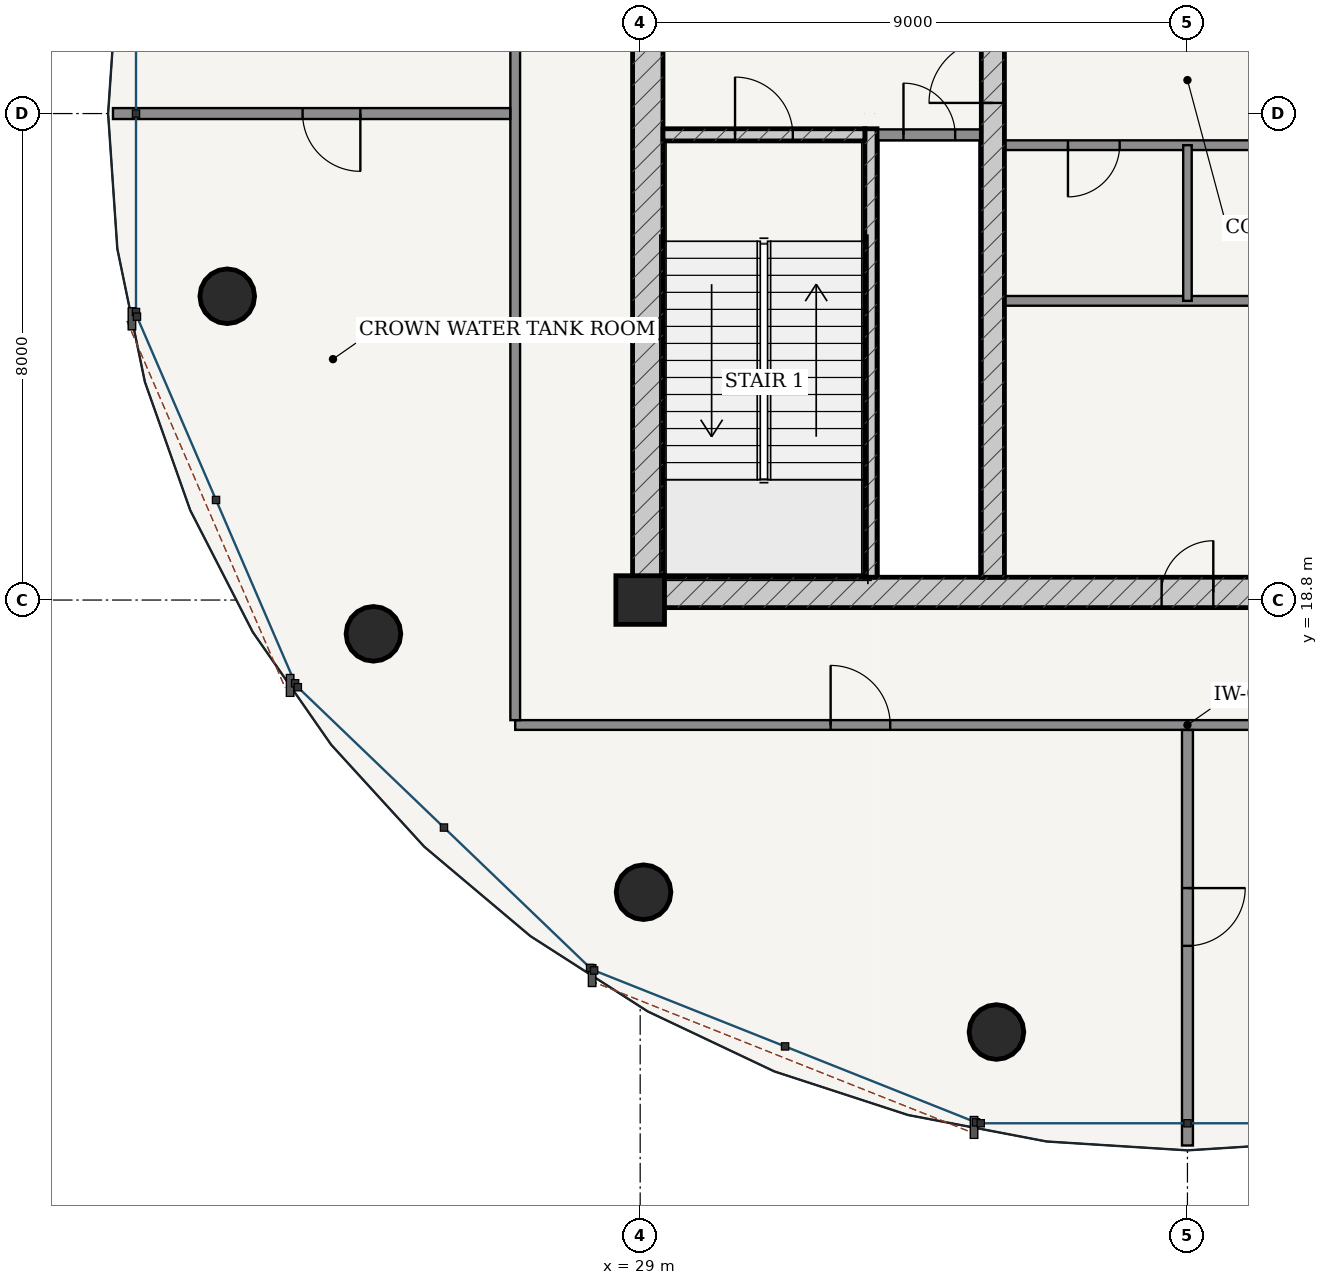
"""IFC4 building model, lengths in metres.
Left out: names, types, materials, properties, quantities, classifications, styles, units other than length and angle.
Written with IfcOpenShell. Run it as: python <this file> out.ifc"""

import sys

from ifc_helpers import new_model, si_unit, direction, frame, frame_2d, origin, origin_2d, place, context, subcontext, project, spatial, rectangle, hollow_circle, extrude, source, transform, mapped, element, fill, save


model = new_model("IFC4")
c1 = context("Model", 3, precision=1e-05, world=origin(), true_north=direction((-0.2419218956, 0.970295726276)))
c2 = subcontext(c1, "Body", "Model", "MODEL_VIEW")
j1 = project(units=[si_unit("LENGTHUNIT", "METRE"), si_unit("PLANEANGLEUNIT", "RADIAN")], contexts=[c1])
p1 = place(None, origin())
s1 = spatial("IfcSite", under=j1, at=p1, CompositionType="ELEMENT")
p2 = place(p1, origin())
s2 = spatial("IfcBuilding", under=s1, at=p2, CompositionType="ELEMENT")
p3 = place(p2, frame((0.0, 0.0, 316.5)))
s3 = spatial("IfcBuildingStorey", under=s2, at=p3, CompositionType="ELEMENT", Elevation=316.5)
p4 = place(p3, frame((29.0, 18.8, 0.0), z_axis=(0.0, 0.0, 1.0), x_axis=(1.0, 0.0, 0.0)))
e1 = element("IfcColumn", 1, at=p4, inside=s3, PredefinedType="COLUMN", context=c2, shape_type="SweptSolid", body=[
    extrude(rectangle(XDim=0.8, YDim=0.8, at=origin_2d()), origin(), (0.0, 0.0, 1.0), 5.2),
])
p5 = place(p3, frame((28.875, 18.925, 0.0), z_axis=(0.0, 0.0, 1.0), x_axis=(1.0, 0.0, 0.0)))
e2 = element("IfcWall", 2, at=p5, inside=s3, PredefinedType="SHEAR", context=c2, shape_type="SweptSolid", body=[
    extrude(rectangle(XDim=18.25, YDim=0.5, at=frame_2d((9.125, 0.0))), origin(), (0.0, 0.0, 1.0), 4.78),
])
p6 = place(p5, frame((8.7, 0.0, 0.0)))
e3 = element("IfcOpeningElement", 3, at=p6, cuts=e2, PredefinedType="OPENING", context=c2, shape_type="SweptSolid", body=[
    extrude(rectangle(XDim=0.85, YDim=2.1, at=frame_2d((0.425, 1.05))), frame((0.0, 0.26, 0.0), z_axis=(0.0, -1.0, 0.0), x_axis=(1.0, 0.0, 0.0)), (0.0, 0.0, 1.0), 0.52),
])
p7 = place(p3, frame((29.125, 19.175, 0.0), z_axis=(0.0, 0.0, 1.0), x_axis=(0.0, 1.0, 0.0)))
e4 = element("IfcWall", 4, at=p7, inside=s3, PredefinedType="SHEAR", context=c2, shape_type="SweptSolid", body=[
    extrude(rectangle(XDim=15.25, YDim=0.5, at=frame_2d((7.625, 0.0))), origin(), (0.0, 0.0, 1.0), 4.78),
])
p8 = place(p7, frame((9.875, 0.0, 0.0)))
e5 = element("IfcOpeningElement", 5, at=p8, cuts=e4, PredefinedType="OPENING", context=c2, shape_type="SweptSolid", body=[
    extrude(rectangle(XDim=1.5, YDim=2.2, at=frame_2d((0.75, 1.1))), frame((0.0, 0.26, 0.0), z_axis=(0.0, -1.0, 0.0), x_axis=(1.0, 0.0, 0.0)), (0.0, 0.0, 1.0), 0.52),
])
p9 = place(p3, frame((32.795, 19.175, 0.0), z_axis=(0.0, 0.0, 1.0), x_axis=(0.0, 1.0, 0.0)))
e6 = element("IfcWall", 6, at=p9, inside=s3, PredefinedType="SOLIDWALL", context=c2, shape_type="SweptSolid", body=[
    extrude(rectangle(XDim=7.375, YDim=0.2, at=frame_2d((3.688, 0.0))), origin(), (0.0, 0.0, 1.0), 4.78),
])
p10 = place(p3, frame((29.375, 26.45, 0.0), z_axis=(0.0, 0.0, 1.0), x_axis=(1.0, 0.0, 0.0)))
e7 = element("IfcWall", 7, at=p10, inside=s3, PredefinedType="SOLIDWALL", context=c2, shape_type="SweptSolid", body=[
    extrude(rectangle(XDim=3.32, YDim=0.2, at=frame_2d((1.66, 0.0))), origin(), (0.0, 0.0, 1.0), 4.78),
])
p11 = place(p10, frame((1.185, 0.0, 0.0)))
e8 = element("IfcOpeningElement", 8, at=p11, cuts=e7, PredefinedType="OPENING", context=c2, shape_type="SweptSolid", body=[
    extrude(rectangle(XDim=0.95, YDim=2.15, at=frame_2d((0.475, 1.075))), frame((0.0, 0.11, 0.0), z_axis=(0.0, -1.0, 0.0), x_axis=(1.0, 0.0, 0.0)), (0.0, 0.0, 1.0), 0.22),
])
p12 = place(p3, frame((34.8, 19.175, 0.0), z_axis=(0.0, 0.0, 1.0), x_axis=(0.0, 1.0, 0.0)))
e9 = element("IfcWall", 9, at=p12, inside=s3, PredefinedType="SHEAR", context=c2, shape_type="SweptSolid", body=[
    extrude(rectangle(XDim=15.25, YDim=0.38, at=frame_2d((7.625, 0.0))), origin(), (0.0, 0.0, 1.0), 4.78),
])
p13 = place(p12, frame((7.8, 0.0, 0.0)))
e10 = element("IfcOpeningElement", 10, at=p13, cuts=e9, PredefinedType="OPENING", context=c2, shape_type="SweptSolid", body=[
    extrude(rectangle(XDim=1.05, YDim=2.15, at=frame_2d((0.525, 1.075))), frame((0.0, 0.2, 0.0), z_axis=(0.0, -1.0, 0.0), x_axis=(1.0, 0.0, 0.0)), (0.0, 0.0, 1.0), 0.4),
])
for number, where, z_axis, x_axis in (
    (11, (22.209, 23.796, 0.0), (0.0, 0.0, 1.0), (1.0, 0.0, 0.0)),
    (12, (24.613, 18.244, 0.0), (0.0, 0.0, 1.0), (1.0, 0.0, 0.0)),
    (13, (29.055, 13.995, 0.0), (0.0, 0.0, 1.0), (1.0, 0.0, 0.0)),
    (14, (34.859, 11.696, 0.0), (0.0, 0.0, 1.0), (1.0, 0.0, 0.0)),
):
    element("IfcColumn", number, at=place(p3, frame(where, z_axis=z_axis, x_axis=x_axis)), inside=s3, PredefinedType="COLUMN", context=c2, shape_type="SweptSolid", body=[
        extrude(hollow_circle(Radius=0.45, WallThickness=0.032, at=origin_2d()), origin(), (0.0, 0.0, 1.0), 5.2),
    ])
p14 = place(p3, frame((32.9, 26.45, 0.0), z_axis=(0.0, 0.0, 1.0), x_axis=(1.0, 0.0, 0.0)))
e15 = element("IfcWall", 15, at=p14, inside=s3, PredefinedType="PARTITIONING", context=c2, shape_type="SweptSolid", body=[
    extrude(rectangle(XDim=1.71, YDim=0.18, at=frame_2d((0.855, 0.0))), origin(), (0.0, 0.0, 1.0), 4.78),
])
p15 = place(p14, frame((0.43, 0.0, 0.0)))
e16 = element("IfcOpeningElement", 16, at=p15, cuts=e15, PredefinedType="OPENING", context=c2, shape_type="SweptSolid", body=[
    extrude(rectangle(XDim=0.85, YDim=2.1, at=frame_2d((0.425, 1.05))), frame((0.0, 0.1, 0.0), z_axis=(0.0, -1.0, 0.0), x_axis=(1.0, 0.0, 0.0)), (0.0, 0.0, 1.0), 0.2),
])
p16 = place(p3, frame((34.99, 26.28, 0.0), z_axis=(0.0, 0.0, 1.0), x_axis=(1.0, 0.0, 0.0)))
e17 = element("IfcWall", 17, at=p16, inside=s3, PredefinedType="PARTITIONING", context=c2, shape_type="SweptSolid", body=[
    extrude(rectangle(XDim=6.02, YDim=0.16, at=frame_2d((3.01, 0.0))), origin(), (0.0, 0.0, 1.0), 4.78),
])
p17 = place(p16, frame((1.045, 0.0, 0.0)))
e18 = element("IfcOpeningElement", 18, at=p17, cuts=e17, PredefinedType="OPENING", context=c2, shape_type="SweptSolid", body=[
    extrude(rectangle(XDim=0.85, YDim=2.1, at=frame_2d((0.425, 1.05))), frame((0.0, 0.09, 0.0), z_axis=(0.0, -1.0, 0.0), x_axis=(1.0, 0.0, 0.0)), (0.0, 0.0, 1.0), 0.18),
])
p18 = place(p16, frame((4.125, 0.0, 0.0)))
e19 = element("IfcOpeningElement", 19, at=p18, cuts=e17, PredefinedType="OPENING", context=c2, shape_type="SweptSolid", body=[
    extrude(rectangle(XDim=0.85, YDim=2.1, at=frame_2d((0.425, 1.05))), frame((0.0, 0.09, 0.0), z_axis=(0.0, -1.0, 0.0), x_axis=(1.0, 0.0, 0.0)), (0.0, 0.0, 1.0), 0.18),
])
p19 = place(p3, frame((34.99, 23.72, 0.0), z_axis=(0.0, 0.0, 1.0), x_axis=(1.0, 0.0, 0.0)))
e20 = element("IfcWall", 20, at=p19, inside=s3, PredefinedType="PARTITIONING", context=c2, shape_type="SweptSolid", body=[
    extrude(rectangle(XDim=6.02, YDim=0.16, at=frame_2d((3.01, 0.0))), origin(), (0.0, 0.0, 1.0), 4.78),
])
p20 = place(p3, frame((38.0, 23.72, 0.0), z_axis=(0.0, 0.0, 1.0), x_axis=(0.0, 1.0, 0.0)))
e21 = element("IfcWall", 21, at=p20, inside=s3, PredefinedType="PARTITIONING", context=c2, shape_type="SweptSolid", body=[
    extrude(rectangle(XDim=2.56, YDim=0.14, at=frame_2d((1.28, 0.0))), origin(), (0.0, 0.0, 1.0), 4.78),
])
p21 = place(p3, frame((26.945, 16.745, 0.0), z_axis=(0.0, 0.0, 1.0), x_axis=(1.0, 0.0, 0.0)))
e22 = element("IfcWall", 22, at=p21, inside=s3, PredefinedType="PARTITIONING", context=c2, shape_type="SweptSolid", body=[
    extrude(rectangle(XDim=22.11, YDim=0.16, at=frame_2d((11.055, 0.0))), origin(), (0.0, 0.0, 1.0), 4.352),
])
p22 = place(p21, frame((5.187, 0.0, 0.0)))
e23 = element("IfcOpeningElement", 23, at=p22, cuts=e22, PredefinedType="OPENING", context=c2, shape_type="SweptSolid", body=[
    extrude(rectangle(XDim=0.98, YDim=2.2, at=frame_2d((0.49, 1.1))), frame((0.0, 0.09, 0.0), z_axis=(0.0, -1.0, 0.0), x_axis=(1.0, 0.0, 0.0)), (0.0, 0.0, 1.0), 0.18),
])
p23 = place(p21, frame((15.943, 0.0, 0.0)))
e24 = element("IfcOpeningElement", 24, at=p23, cuts=e22, PredefinedType="OPENING", context=c2, shape_type="SweptSolid", body=[
    extrude(rectangle(XDim=0.98, YDim=2.2, at=frame_2d((0.49, 1.1))), frame((0.0, 0.09, 0.0), z_axis=(0.0, -1.0, 0.0), x_axis=(1.0, 0.0, 0.0)), (0.0, 0.0, 1.0), 0.18),
])
p24 = place(p3, frame((26.945, 16.825, 0.0), z_axis=(0.0, 0.0, 1.0), x_axis=(0.0, 1.0, 0.0)))
e25 = element("IfcWall", 25, at=p24, inside=s3, PredefinedType="PARTITIONING", context=c2, shape_type="SweptSolid", body=[
    extrude(rectangle(XDim=19.95, YDim=0.16, at=frame_2d((9.975, 0.0))), origin(), (0.0, 0.0, 1.0), 4.352),
])
p25 = place(p3, frame((26.863, 26.8, 0.0), z_axis=(0.0, 0.0, 1.0), x_axis=(-1.0, 0.0, 0.0)))
e26 = element("IfcWall", 26, at=p25, inside=s3, PredefinedType="PARTITIONING", context=c2, shape_type="SweptSolid", body=[
    extrude(rectangle(XDim=6.533, YDim=0.18, at=frame_2d((3.267, 0.0))), origin(), (0.0, 0.0, 1.0), 4.411),
])
p26 = place(p25, frame((2.465, 0.0, 0.0)))
e27 = element("IfcOpeningElement", 27, at=p26, cuts=e26, PredefinedType="OPENING", context=c2, shape_type="SweptSolid", body=[
    extrude(rectangle(XDim=0.95, YDim=2.15, at=frame_2d((0.475, 1.075))), frame((0.0, 0.1, 0.0), z_axis=(0.0, -1.0, 0.0), x_axis=(1.0, 0.0, 0.0)), (0.0, 0.0, 1.0), 0.2),
])
p27 = place(p3, frame((38.0, 16.663, 0.0), z_axis=(0.0, 0.0, 1.0), x_axis=(0.0, -1.0, 0.0)))
e28 = element("IfcWall", 28, at=p27, inside=s3, PredefinedType="PARTITIONING", context=c2, shape_type="SweptSolid", body=[
    extrude(rectangle(XDim=6.833, YDim=0.18, at=frame_2d((3.417, 0.0))), origin(), (0.0, 0.0, 1.0), 4.411),
])
p28 = place(p27, frame((2.6, 0.0, 0.0)))
e29 = element("IfcOpeningElement", 29, at=p28, cuts=e28, PredefinedType="OPENING", context=c2, shape_type="SweptSolid", body=[
    extrude(rectangle(XDim=0.95, YDim=2.15, at=frame_2d((0.475, 1.075))), frame((0.0, 0.1, 0.0), z_axis=(0.0, -1.0, 0.0), x_axis=(1.0, 0.0, 0.0)), (0.0, 0.0, 1.0), 0.2),
])
m1 = source(origin(), c2, "Body", "SweptSolid", [
    extrude(rectangle(XDim=1.05, YDim=2.15, at=frame_2d((0.525, 1.075))), frame((0.0, 0.025, 0.0), z_axis=(0.0, -1.0, 0.0), x_axis=(1.0, 0.0, 0.0)), (0.0, 0.0, 1.0), 0.05),
])
p29 = place(p13, origin())
e30 = element("IfcDoor", 30, at=p29, inside=s3, OperationType="SINGLE_SWING_LEFT", PredefinedType="DOOR", context=c2, shape_type="MappedRepresentation", body=[
    mapped(m1, transform((0.0, 0.0, 0.0), scale=1.0)),
])
fill(e10, e30)
m2 = source(origin(), c2, "Body", "SweptSolid", [
    extrude(rectangle(XDim=0.95, YDim=2.15, at=frame_2d((0.475, 1.075))), frame((0.0, 0.025, 0.0), z_axis=(0.0, -1.0, 0.0), x_axis=(1.0, 0.0, 0.0)), (0.0, 0.0, 1.0), 0.05),
])
p30 = place(p11, origin())
e31 = element("IfcDoor", 31, at=p30, inside=s3, OperationType="SINGLE_SWING_LEFT", PredefinedType="DOOR", context=c2, shape_type="MappedRepresentation", body=[
    mapped(m2, transform((0.0, 0.0, 0.0), scale=1.0)),
])
fill(e8, e31)
m3 = source(origin(), c2, "Body", "SweptSolid", [
    extrude(rectangle(XDim=0.85, YDim=2.1, at=frame_2d((0.425, 1.05))), frame((0.0, 0.025, 0.0), z_axis=(0.0, -1.0, 0.0), x_axis=(1.0, 0.0, 0.0)), (0.0, 0.0, 1.0), 0.05),
])
p31 = place(p15, origin())
e32 = element("IfcDoor", 32, at=p31, inside=s3, OperationType="SINGLE_SWING_LEFT", PredefinedType="DOOR", context=c2, shape_type="MappedRepresentation", body=[
    mapped(m3, transform((0.0, 0.0, 0.0), scale=1.0)),
])
fill(e16, e32)
p32 = place(p17, frame((0.85, 0.0, 0.0), z_axis=(0.0, 0.0, 1.0), x_axis=(-1.0, 0.0, 0.0)))
e33 = element("IfcDoor", 33, at=p32, inside=s3, OperationType="SINGLE_SWING_RIGHT", PredefinedType="DOOR", context=c2, shape_type="MappedRepresentation", body=[
    mapped(m3, transform((0.0, 0.0, 0.0), scale=1.0)),
])
fill(e18, e33)
p33 = place(p6, origin())
e34 = element("IfcDoor", 34, at=p33, inside=s3, OperationType="SINGLE_SWING_RIGHT", PredefinedType="DOOR", context=c2, shape_type="MappedRepresentation", body=[
    mapped(m3, transform((0.0, 0.0, 0.0), scale=1.0)),
])
fill(e3, e34)
m4 = source(origin(), c2, "Body", "SweptSolid", [
    extrude(rectangle(XDim=0.98, YDim=2.2, at=frame_2d((0.49, 1.1))), frame((0.0, 0.025, 0.0), z_axis=(0.0, -1.0, 0.0), x_axis=(1.0, 0.0, 0.0)), (0.0, 0.0, 1.0), 0.05),
])
p34 = place(p22, origin())
e35 = element("IfcDoor", 35, at=p34, inside=s3, OperationType="SINGLE_SWING_LEFT", PredefinedType="DOOR", context=c2, shape_type="MappedRepresentation", body=[
    mapped(m4, transform((0.0, 0.0, 0.0), scale=1.0)),
])
fill(e23, e35)
p35 = place(p26, origin())
e36 = element("IfcDoor", 36, at=p35, inside=s3, OperationType="SINGLE_SWING_LEFT", PredefinedType="DOOR", context=c2, shape_type="MappedRepresentation", body=[
    mapped(m2, transform((0.0, 0.0, 0.0), scale=1.0)),
])
fill(e27, e36)
p36 = place(p28, origin())
e37 = element("IfcDoor", 37, at=p36, inside=s3, OperationType="SINGLE_SWING_LEFT", PredefinedType="DOOR", context=c2, shape_type="MappedRepresentation", body=[
    mapped(m2, transform((0.0, 0.0, 0.0), scale=1.0)),
])
fill(e29, e37)
save(model, sys.argv[1])
